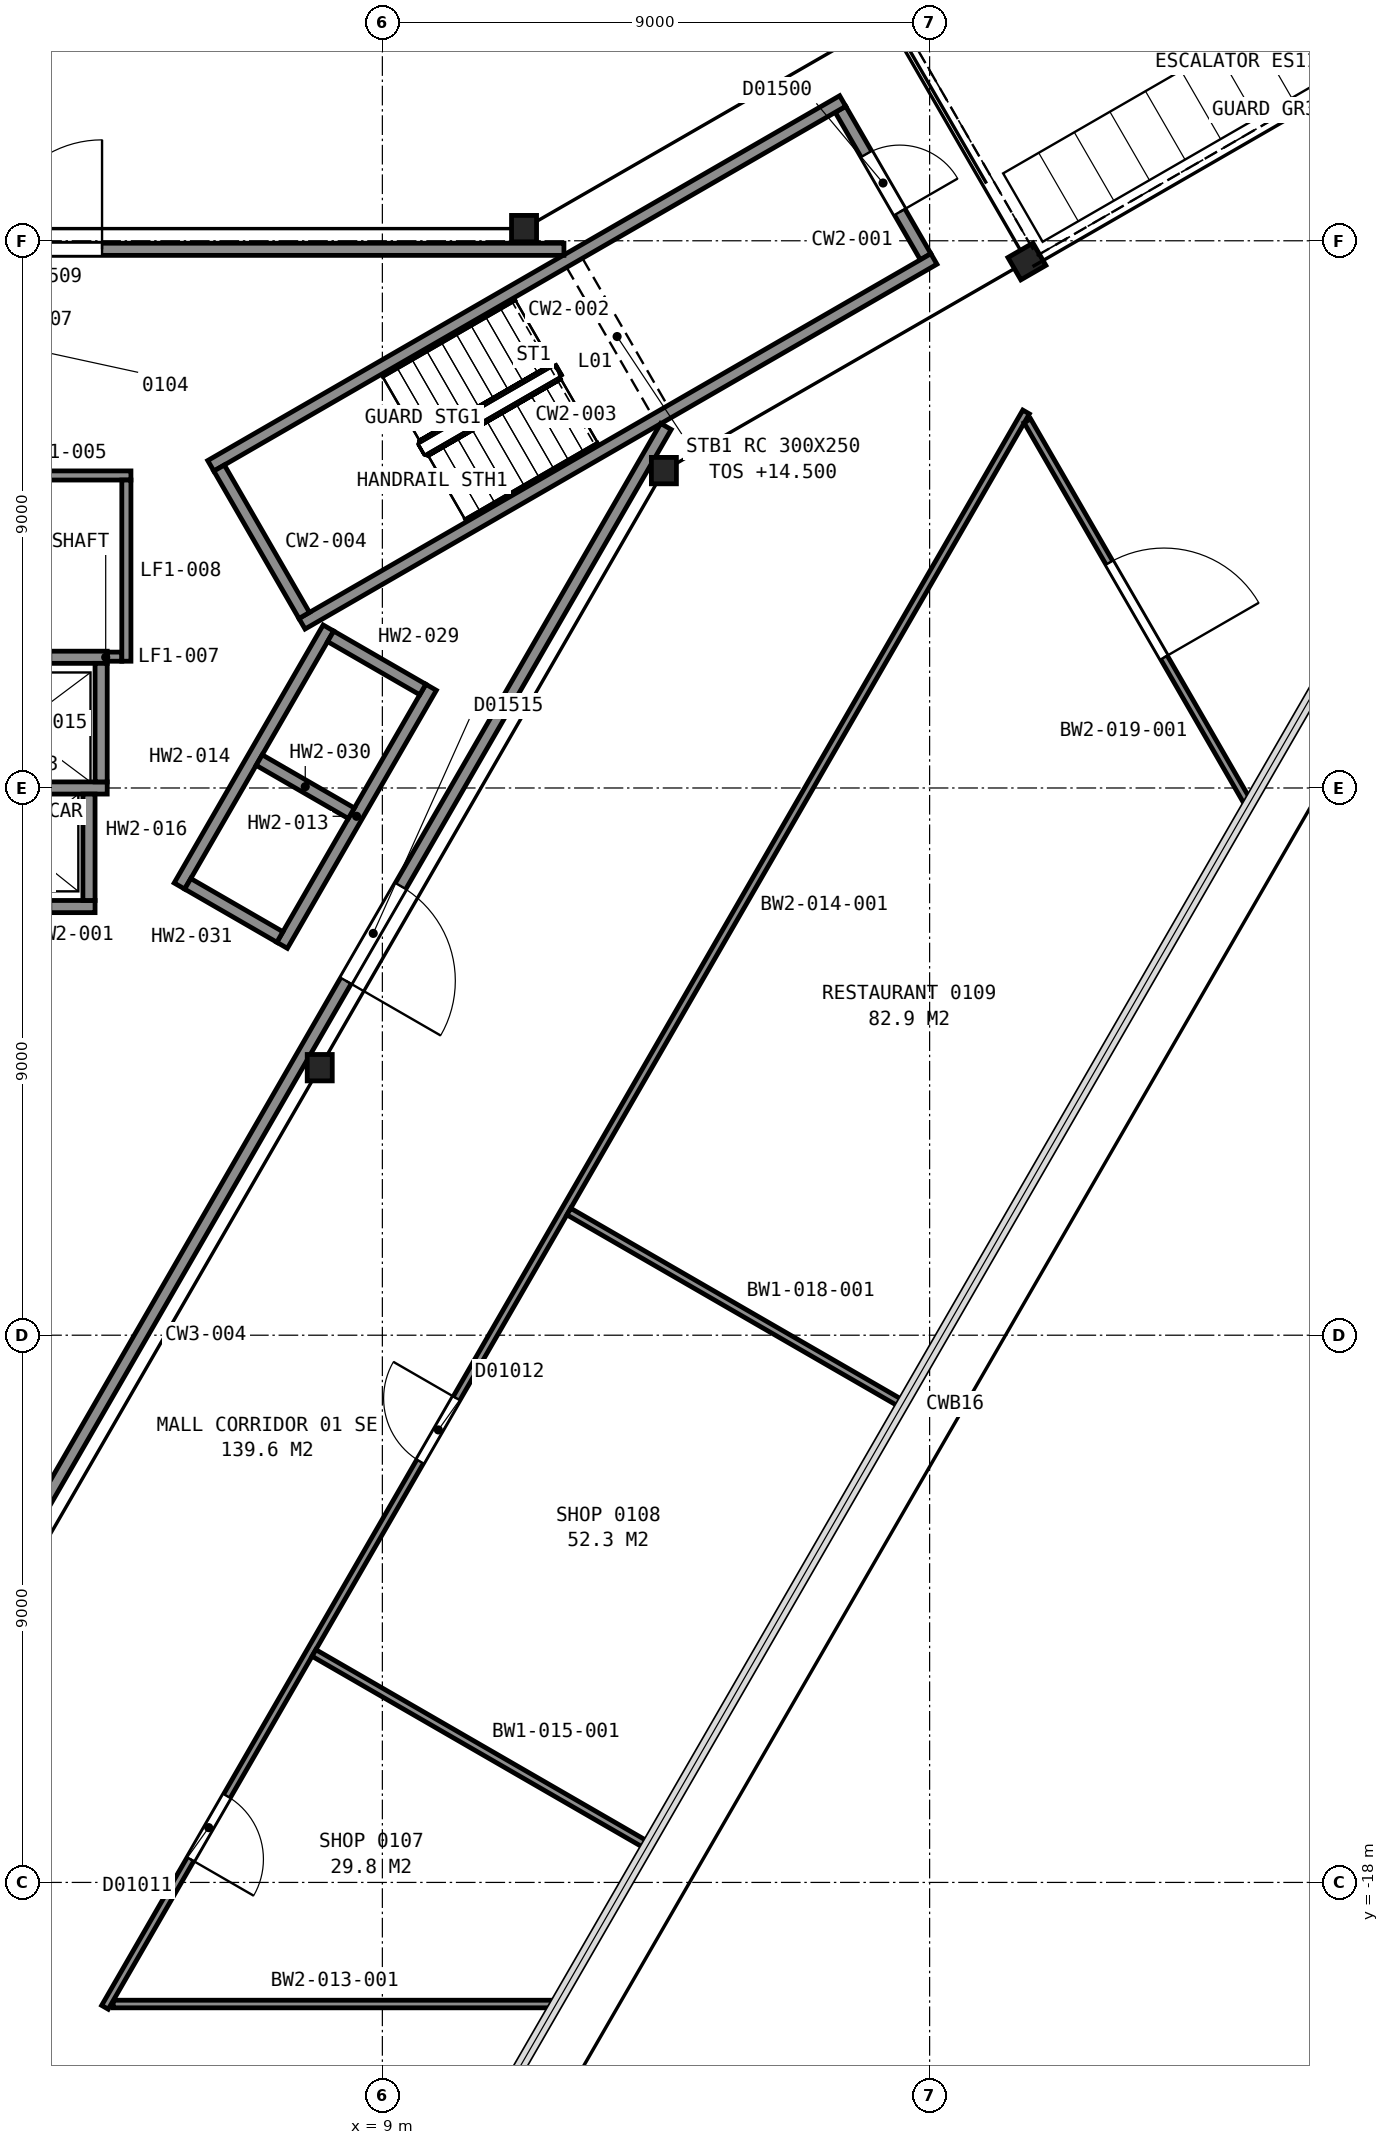
"""IFC4 building model, lengths in metres.
Left out: names, types, materials, properties, quantities, classifications, styles, units other than length and angle.
Written with IfcOpenShell. Run it as: python <this file> out.ifc"""

import sys

from ifc_helpers import new_model, si_unit, direction, frame, frame_2d, origin, origin_2d, place, context, subcontext, project, spatial, rectangle, i_section, extrude, element, fill, save


model = new_model("IFC4")
c1 = context("Model", 3, precision=1e-05, world=origin(), true_north=direction((0.0, 1.0)))
c2 = subcontext(c1, "Body", "Model", "MODEL_VIEW")
j1 = project(units=[si_unit("LENGTHUNIT", "METRE"), si_unit("PLANEANGLEUNIT", "RADIAN")], contexts=[c1])
p1 = place(None, origin())
s1 = spatial("IfcSite", under=j1, at=p1, CompositionType="ELEMENT")
p2 = place(p1, origin())
s2 = spatial("IfcBuilding", under=s1, at=p2, CompositionType="ELEMENT")
p3 = place(p2, frame((0.0, 0.0, 12.0)))
s3 = spatial("IfcBuildingStorey", under=s2, at=p3, CompositionType="ELEMENT", Elevation=12.0)
p4 = place(p3, frame((13.63, 5.22, 0.0), z_axis=(0.0, 0.0, 1.0), x_axis=(1.0, 0.0, 0.0)))
e1 = element("IfcColumn", 1, at=p4, inside=s3, PredefinedType="COLUMN", context=c2, shape_type="SweptSolid", body=[
    extrude(i_section(OverallWidth=0.411, OverallDepth=0.434, WebThickness=0.036, FlangeThickness=0.057, FilletRadius=0.015, at=origin_2d()), origin(), (0.0, 0.0, 1.0), 5.4),
])
p5 = place(p3, frame((19.6, 8.66, 0.0), z_axis=(0.0, 0.0, 1.0), x_axis=(0.5, -0.866025403784, 0.0)))
e2 = element("IfcColumn", 2, at=p5, inside=s3, PredefinedType="COLUMN", context=c2, shape_type="SweptSolid", body=[
    extrude(i_section(OverallWidth=0.424, OverallDepth=0.475, WebThickness=0.048, FlangeThickness=0.077, FilletRadius=0.015, at=origin_2d()), origin(), (0.0, 0.0, 1.0), 5.4),
])
for number, where, z_axis, x_axis in (
    (3, (11.33, 9.2, 0.0), (0.0, 0.0, 1.0), (1.0, 0.0, 0.0)),
    (4, (7.97, -4.6, 0.0), (0.0, 0.0, 1.0), (1.0, 0.0, 0.0)),
):
    element("IfcColumn", number, at=place(p3, frame(where, z_axis=z_axis, x_axis=x_axis)), inside=s3, PredefinedType="COLUMN", context=c2, shape_type="SweptSolid", body=[
        extrude(i_section(OverallWidth=0.411, OverallDepth=0.434, WebThickness=0.036, FlangeThickness=0.057, FilletRadius=0.015, at=origin_2d()), origin(), (0.0, 0.0, 1.0), 5.4),
    ])
p6 = place(p3, frame((17.934, 8.738, 0.0), z_axis=(0.0, 0.0, 1.0), x_axis=(-0.49998411664, 0.866034573852, 0.0)))
e5 = element("IfcWall", 5, at=p6, inside=s3, PredefinedType="PARTITIONING", context=c2, shape_type="SweptSolid", body=[
    extrude(rectangle(XDim=2.8, YDim=0.2, at=frame_2d((1.4, 0.0))), origin(), (0.0, 0.0, 1.0), 5.15),
])
p7 = place(p6, frame((0.85, 0.0, 0.0)))
e6 = element("IfcOpeningElement", 6, at=p7, cuts=e5, PredefinedType="OPENING", context=c2, shape_type="SweptSolid", body=[
    extrude(rectangle(XDim=1.1, YDim=2.1, at=frame_2d((0.55, 1.05))), frame((0.0, 0.11, 0.0), z_axis=(0.0, -1.0, 0.0), x_axis=(1.0, 0.0, 0.0)), (0.0, 0.0, 1.0), 0.22),
])
for number, where, z_axis, x_axis in (
    (7, (6.178, 5.299, 0.0), (0.0, 0.0, 1.0), (0.866, 0.5, 0.0)),
    (8, (7.678, 2.701, 0.0), (0.0, 0.0, 1.0), (0.866, 0.5, 0.0)),
):
    element("IfcWall", number, at=place(p3, frame(where, z_axis=z_axis, x_axis=x_axis)), inside=s3, PredefinedType="PARTITIONING", context=c2, shape_type="SweptSolid", body=[
        extrude(rectangle(XDim=12.0, YDim=0.2, at=frame_2d((6.0, 0.0))), origin(), (0.0, 0.0, 1.0), 5.15),
    ])
p8 = place(p3, frame((7.715, 2.838, 0.0), z_axis=(0.0, 0.0, 1.0), x_axis=(-0.500049511043, 0.865996816683, 0.0)))
e9 = element("IfcWall", 9, at=p8, inside=s3, PredefinedType="PARTITIONING", context=c2, shape_type="SweptSolid", body=[
    extrude(rectangle(XDim=2.8, YDim=0.2, at=frame_2d((1.4, 0.0))), origin(), (0.0, 0.0, 1.0), 5.15),
])
p9 = place(p3, frame((1.725, -1.95, 0.0), z_axis=(0.0, 0.0, 1.0), x_axis=(1.0, 0.0, 0.0)))
e10 = element("IfcWall", 10, at=p9, inside=s3, PredefinedType="PARTITIONING", context=c2, shape_type="SweptSolid", body=[
    extrude(rectangle(XDim=2.55, YDim=0.2, at=frame_2d((1.275, 0.0))), origin(), (0.0, 0.0, 1.0), 5.4),
])
p10 = place(p9, frame((0.725, 0.0, 0.0)))
e11 = element("IfcOpeningElement", 11, at=p10, cuts=e10, PredefinedType="OPENING", context=c2, shape_type="SweptSolid", body=[
    extrude(rectangle(XDim=1.1, YDim=2.1, at=frame_2d((0.55, 1.05))), frame((0.0, 0.11, 0.0), z_axis=(0.0, -1.0, 0.0), x_axis=(1.0, 0.0, 0.0)), (0.0, 0.0, 1.0), 0.22),
])
p11 = place(p3, frame((1.525, 0.0, 0.0), z_axis=(0.0, 0.0, 1.0), x_axis=(1.0, 0.0, 0.0)))
e12 = element("IfcWall", 12, at=p11, inside=s3, PredefinedType="PARTITIONING", context=c2, shape_type="SweptSolid", body=[
    extrude(rectangle(XDim=2.95, YDim=0.2, at=frame_2d((1.475, 0.0))), origin(), (0.0, 0.0, 1.0), 5.4),
])
p12 = place(p3, frame((1.525, 2.15, 0.0), z_axis=(0.0, 0.0, 1.0), x_axis=(1.0, 0.0, 0.0)))
e13 = element("IfcWall", 13, at=p12, inside=s3, PredefinedType="PARTITIONING", context=c2, shape_type="SweptSolid", body=[
    extrude(rectangle(XDim=2.95, YDim=0.2, at=frame_2d((1.475, 0.0))), origin(), (0.0, 0.0, 1.0), 5.4),
])
p13 = place(p12, frame((0.925, 0.0, 0.0)))
e14 = element("IfcOpeningElement", 14, at=p13, cuts=e13, PredefinedType="OPENING", context=c2, shape_type="SweptSolid", body=[
    extrude(rectangle(XDim=1.1, YDim=2.1, at=frame_2d((0.55, 1.05))), frame((0.0, 0.11, 0.0), z_axis=(0.0, -1.0, 0.0), x_axis=(1.0, 0.0, 0.0)), (0.0, 0.0, 1.0), 0.22),
])
p14 = place(p3, frame((7.351, -2.587, 0.0), z_axis=(0.0, 0.0, 1.0), x_axis=(0.500002801628, 0.866023786258, 0.0)))
e15 = element("IfcWall", 15, at=p14, inside=s3, PredefinedType="PARTITIONING", context=c2, shape_type="SweptSolid", body=[
    extrude(rectangle(XDim=4.9, YDim=0.2, at=frame_2d((2.45, 0.0))), origin(), (0.0, 0.0, 1.0), 5.4),
])
p15 = place(p3, frame((5.663, -1.612, 0.0), z_axis=(0.0, 0.0, 1.0), x_axis=(0.49998122708, 0.866036242063, 0.0)))
e16 = element("IfcWall", 16, at=p15, inside=s3, PredefinedType="PARTITIONING", context=c2, shape_type="SweptSolid", body=[
    extrude(rectangle(XDim=4.9, YDim=0.2, at=frame_2d((2.45, 0.0))), origin(), (0.0, 0.0, 1.0), 5.4),
])
p16 = place(p3, frame((4.375, 0.1, 0.0), z_axis=(0.0, 0.0, 1.0), x_axis=(0.0, 1.0, 0.0)))
e17 = element("IfcWall", 17, at=p16, inside=s3, PredefinedType="PARTITIONING", context=c2, shape_type="SweptSolid", body=[
    extrude(rectangle(XDim=1.95, YDim=0.2, at=frame_2d((0.975, 0.0))), origin(), (0.0, 0.0, 1.0), 5.4),
])
p17 = place(p3, frame((4.175, -1.85, 0.0), z_axis=(0.0, 0.0, 1.0), x_axis=(0.0, 1.0, 0.0)))
e18 = element("IfcWall", 18, at=p17, inside=s3, PredefinedType="PARTITIONING", context=c2, shape_type="SweptSolid", body=[
    extrude(rectangle(XDim=1.75, YDim=0.2, at=frame_2d((0.875, 0.0))), origin(), (0.0, 0.0, 1.0), 5.4),
])
p18 = place(p3, frame((9.665, 1.62, 0.0), z_axis=(0.0, 0.0, 1.0), x_axis=(-0.866002029911, 0.500040482552, 0.0)))
e19 = element("IfcWall", 19, at=p18, inside=s3, PredefinedType="PARTITIONING", context=c2, shape_type="SweptSolid", body=[
    extrude(rectangle(XDim=1.75, YDim=0.2, at=frame_2d((0.875, 0.0))), origin(), (0.0, 0.0, 1.0), 5.4),
])
for number, where, z_axis, x_axis in (
    (20, (8.49, -0.416, 0.0), (0.0, 0.0, 1.0), (-0.866, 0.5, 0.0)),
    (21, (7.315, -2.451, 0.0), (0.0, 0.0, 1.0), (-0.866, 0.5, 0.0)),
):
    element("IfcWall", number, at=place(p3, frame(where, z_axis=z_axis, x_axis=x_axis)), inside=s3, PredefinedType="PARTITIONING", context=c2, shape_type="SweptSolid", body=[
        extrude(rectangle(XDim=1.75, YDim=0.2, at=frame_2d((0.875, 0.0))), origin(), (0.0, 0.0, 1.0), 5.4),
    ])
p19 = place(p3, frame((11.986, 8.86, 0.0), z_axis=(0.0, 0.0, 1.0), x_axis=(-1.0, 0.0, 0.0)))
e22 = element("IfcWall", 22, at=p19, inside=s3, PredefinedType="PARTITIONING", context=c2, shape_type="SweptSolid", body=[
    extrude(rectangle(XDim=23.967, YDim=0.2, at=frame_2d((11.983, 0.0))), origin(), (0.0, 0.0, 1.0), 5.15),
])
p20 = place(p19, frame((7.596, 0.0, 0.0)))
e23 = element("IfcOpeningElement", 23, at=p20, cuts=e22, PredefinedType="OPENING", context=c2, shape_type="SweptSolid", body=[
    extrude(rectangle(XDim=1.8, YDim=2.1, at=frame_2d((0.9, 1.05))), frame((0.0, 0.11, 0.0), z_axis=(0.0, -1.0, 0.0), x_axis=(1.0, 0.0, 0.0)), (0.0, 0.0, 1.0), 0.22),
])
p21 = place(p3, frame((-0.245, 5.14, 0.0), z_axis=(0.0, 0.0, 1.0), x_axis=(1.0, 0.0, 0.0)))
e24 = element("IfcWall", 24, at=p21, inside=s3, PredefinedType="PARTITIONING", context=c2, shape_type="SweptSolid", body=[
    extrude(rectangle(XDim=5.11, YDim=0.15, at=frame_2d((2.555, 0.0))), origin(), (0.0, 0.0, 1.0), 5.15),
])
p22 = place(p21, frame((1.975, 0.0, 0.0)))
e25 = element("IfcOpeningElement", 25, at=p22, cuts=e24, PredefinedType="OPENING", context=c2, shape_type="SweptSolid", body=[
    extrude(rectangle(XDim=1.0, YDim=2.1, at=frame_2d((0.5, 1.05))), frame((0.0, 0.085, 0.0), z_axis=(0.0, -1.0, 0.0), x_axis=(1.0, 0.0, 0.0)), (0.0, 0.0, 1.0), 0.17),
])
p23 = place(p3, frame((1.68, -14.811, 0.0), z_axis=(0.0, 0.0, 1.0), x_axis=(0.499994327219, 0.866028678941, 0.0)))
e26 = element("IfcWall", 26, at=p23, inside=s3, PredefinedType="PARTITIONING", context=c2, shape_type="SweptSolid", body=[
    extrude(rectangle(XDim=23.968, YDim=0.2, at=frame_2d((11.984, 0.0))), origin(), (0.0, 0.0, 1.0), 5.15),
])
p24 = place(p23, frame((13.44, 0.0, 0.0)))
e27 = element("IfcOpeningElement", 27, at=p24, cuts=e26, PredefinedType="OPENING", context=c2, shape_type="SweptSolid", body=[
    extrude(rectangle(XDim=1.8, YDim=2.1, at=frame_2d((0.9, 1.05))), frame((0.0, 0.11, 0.0), z_axis=(0.0, -1.0, 0.0), x_axis=(1.0, 0.0, 0.0)), (0.0, 0.0, 1.0), 0.22),
])
p25 = place(p3, frame((4.477, 2.16, 0.0), z_axis=(0.0, 0.0, 1.0), x_axis=(1.0, 0.0, 0.0)))
e28 = element("IfcWall", 28, at=p25, inside=s3, PredefinedType="PARTITIONING", context=c2, shape_type="SweptSolid", body=[
    extrude(rectangle(XDim=0.238, YDim=0.15, at=frame_2d((0.119, 0.0))), origin(), (0.0, 0.0, 1.0), 5.15),
])
p26 = place(p3, frame((4.79, 2.085, 0.0), z_axis=(0.0, 0.0, 1.0), x_axis=(0.0, 1.0, 0.0)))
e29 = element("IfcWall", 29, at=p26, inside=s3, PredefinedType="PARTITIONING", context=c2, shape_type="SweptSolid", body=[
    extrude(rectangle(XDim=2.98, YDim=0.15, at=frame_2d((1.49, 0.0))), origin(), (0.0, 0.0, 1.0), 5.15),
])
p27 = place(p3, frame((4.574, -20.0, 0.0), z_axis=(0.0, 0.0, 1.0), x_axis=(1.0, 0.0, 0.0)))
e30 = element("IfcWall", 30, at=p27, inside=s3, PredefinedType="PARTITIONING", context=c2, shape_type="SweptSolid", body=[
    extrude(rectangle(XDim=7.285, YDim=0.125, at=frame_2d((3.643, 0.0))), origin(), (0.0, 0.0, 1.0), 5.24),
])
p28 = place(p3, frame((19.586, 6.184, 0.0), z_axis=(0.0, 0.0, 1.0), x_axis=(-0.499994028088, -0.866028851642, 0.0)))
e31 = element("IfcWall", 31, at=p28, inside=s3, PredefinedType="PARTITIONING", context=c2, shape_type="SweptSolid", body=[
    extrude(rectangle(XDim=30.297, YDim=0.125, at=frame_2d((15.148, 0.0))), origin(), (0.0, 0.0, 1.0), 4.253),
])
p29 = place(p28, frame((26.285, 0.0, 0.0)))
e32 = element("IfcOpeningElement", 32, at=p29, cuts=e31, PredefinedType="OPENING", context=c2, shape_type="SweptSolid", body=[
    extrude(rectangle(XDim=1.2, YDim=2.1, at=frame_2d((0.6, 1.05))), frame((0.0, 0.073, 0.0), z_axis=(0.0, -1.0, 0.0), x_axis=(1.0, 0.0, 0.0)), (0.0, 0.0, 1.0), 0.145),
])
p30 = place(p28, frame((18.732, 0.0, 0.0)))
e33 = element("IfcOpeningElement", 33, at=p30, cuts=e31, PredefinedType="OPENING", context=c2, shape_type="SweptSolid", body=[
    extrude(rectangle(XDim=1.2, YDim=2.1, at=frame_2d((0.6, 1.05))), frame((0.0, 0.073, 0.0), z_axis=(0.0, -1.0, 0.0), x_axis=(1.0, 0.0, 0.0)), (0.0, 0.0, 1.0), 0.145),
])
for number, where, z_axis, x_axis in (
    (34, (7.875, -14.226, 0.0), (0.0, 0.0, 1.0), (0.866, -0.5, 0.0)),
    (35, (12.066, -6.966, 0.0), (0.0, 0.0, 1.0), (0.866, -0.5, 0.0)),
):
    element("IfcWall", number, at=place(p3, frame(where, z_axis=z_axis, x_axis=x_axis)), inside=s3, PredefinedType="PARTITIONING", context=c2, shape_type="SweptSolid", body=[
        extrude(rectangle(XDim=6.337, YDim=0.125, at=frame_2d((3.168, 0.0))), origin(), (0.0, 0.0, 1.0), 4.253),
    ])
p31 = place(p3, frame((23.25, -0.27, 0.0), z_axis=(0.0, 0.0, 1.0), x_axis=(-0.500002873931, 0.866023744513, 0.0)))
e36 = element("IfcWall", 36, at=p31, inside=s3, PredefinedType="PARTITIONING", context=c2, shape_type="SweptSolid", body=[
    extrude(rectangle(XDim=7.285, YDim=0.125, at=frame_2d((3.643, 0.0))), origin(), (0.0, 0.0, 1.0), 5.24),
])
p32 = place(p31, frame((2.79, 0.0, 0.0)))
e37 = element("IfcOpeningElement", 37, at=p32, cuts=e36, PredefinedType="OPENING", context=c2, shape_type="SweptSolid", body=[
    extrude(rectangle(XDim=1.8, YDim=2.4, at=frame_2d((0.9, 1.2))), frame((0.0, 0.073, 0.0), z_axis=(0.0, -1.0, 0.0), x_axis=(1.0, 0.0, 0.0)), (0.0, 0.0, 1.0), 0.145),
])
p33 = place(p7, origin())
e38 = element("IfcDoor", 38, at=p33, inside=s3, OperationType="SINGLE_SWING_LEFT", PredefinedType="DOOR", context=c2, shape_type="SweptSolid", body=[
    extrude(rectangle(XDim=1.1, YDim=2.1, at=frame_2d((0.55, 1.05))), frame((0.0, 0.025, 0.0), z_axis=(0.0, -1.0, 0.0), x_axis=(1.0, 0.0, 0.0)), (0.0, 0.0, 1.0), 0.05),
])
fill(e6, e38)
p34 = place(p20, origin())
e39 = element("IfcDoor", 39, at=p34, inside=s3, OperationType="DOUBLE_DOOR_SINGLE_SWING", PredefinedType="DOOR", context=c2, shape_type="SweptSolid", body=[
    extrude(rectangle(XDim=1.8, YDim=2.1, at=frame_2d((0.9, 1.05))), frame((0.0, 0.025, 0.0), z_axis=(0.0, -1.0, 0.0), x_axis=(1.0, 0.0, 0.0)), (0.0, 0.0, 1.0), 0.05),
])
fill(e23, e39)
p35 = place(p24, origin())
e40 = element("IfcDoor", 40, at=p35, inside=s3, OperationType="DOUBLE_DOOR_SINGLE_SWING", PredefinedType="DOOR", context=c2, shape_type="SweptSolid", body=[
    extrude(rectangle(XDim=1.8, YDim=2.1, at=frame_2d((0.9, 1.05))), frame((0.0, 0.025, 0.0), z_axis=(0.0, -1.0, 0.0), x_axis=(1.0, 0.0, 0.0)), (0.0, 0.0, 1.0), 0.05),
])
fill(e27, e40)
p36 = place(p29, origin())
e41 = element("IfcDoor", 41, at=p36, inside=s3, OperationType="SINGLE_SWING_RIGHT", PredefinedType="DOOR", context=c2, shape_type="SweptSolid", body=[
    extrude(rectangle(XDim=1.2, YDim=2.1, at=frame_2d((0.6, 1.05))), frame((0.0, 0.025, 0.0), z_axis=(0.0, -1.0, 0.0), x_axis=(1.0, 0.0, 0.0)), (0.0, 0.0, 1.0), 0.05),
])
fill(e32, e41)
p37 = place(p30, origin())
e42 = element("IfcDoor", 42, at=p37, inside=s3, OperationType="SINGLE_SWING_LEFT", PredefinedType="DOOR", context=c2, shape_type="SweptSolid", body=[
    extrude(rectangle(XDim=1.2, YDim=2.1, at=frame_2d((0.6, 1.05))), frame((0.0, 0.025, 0.0), z_axis=(0.0, -1.0, 0.0), x_axis=(1.0, 0.0, 0.0)), (0.0, 0.0, 1.0), 0.05),
])
fill(e33, e42)
p38 = place(p32, origin())
e43 = element("IfcDoor", 43, at=p38, inside=s3, OperationType="DOUBLE_DOOR_SINGLE_SWING", PredefinedType="DOOR", context=c2, shape_type="SweptSolid", body=[
    extrude(rectangle(XDim=1.8, YDim=2.4, at=frame_2d((0.9, 1.2))), frame((0.0, 0.025, 0.0), z_axis=(0.0, -1.0, 0.0), x_axis=(1.0, 0.0, 0.0)), (0.0, 0.0, 1.0), 0.05),
])
fill(e37, e43)
save(model, sys.argv[1])
